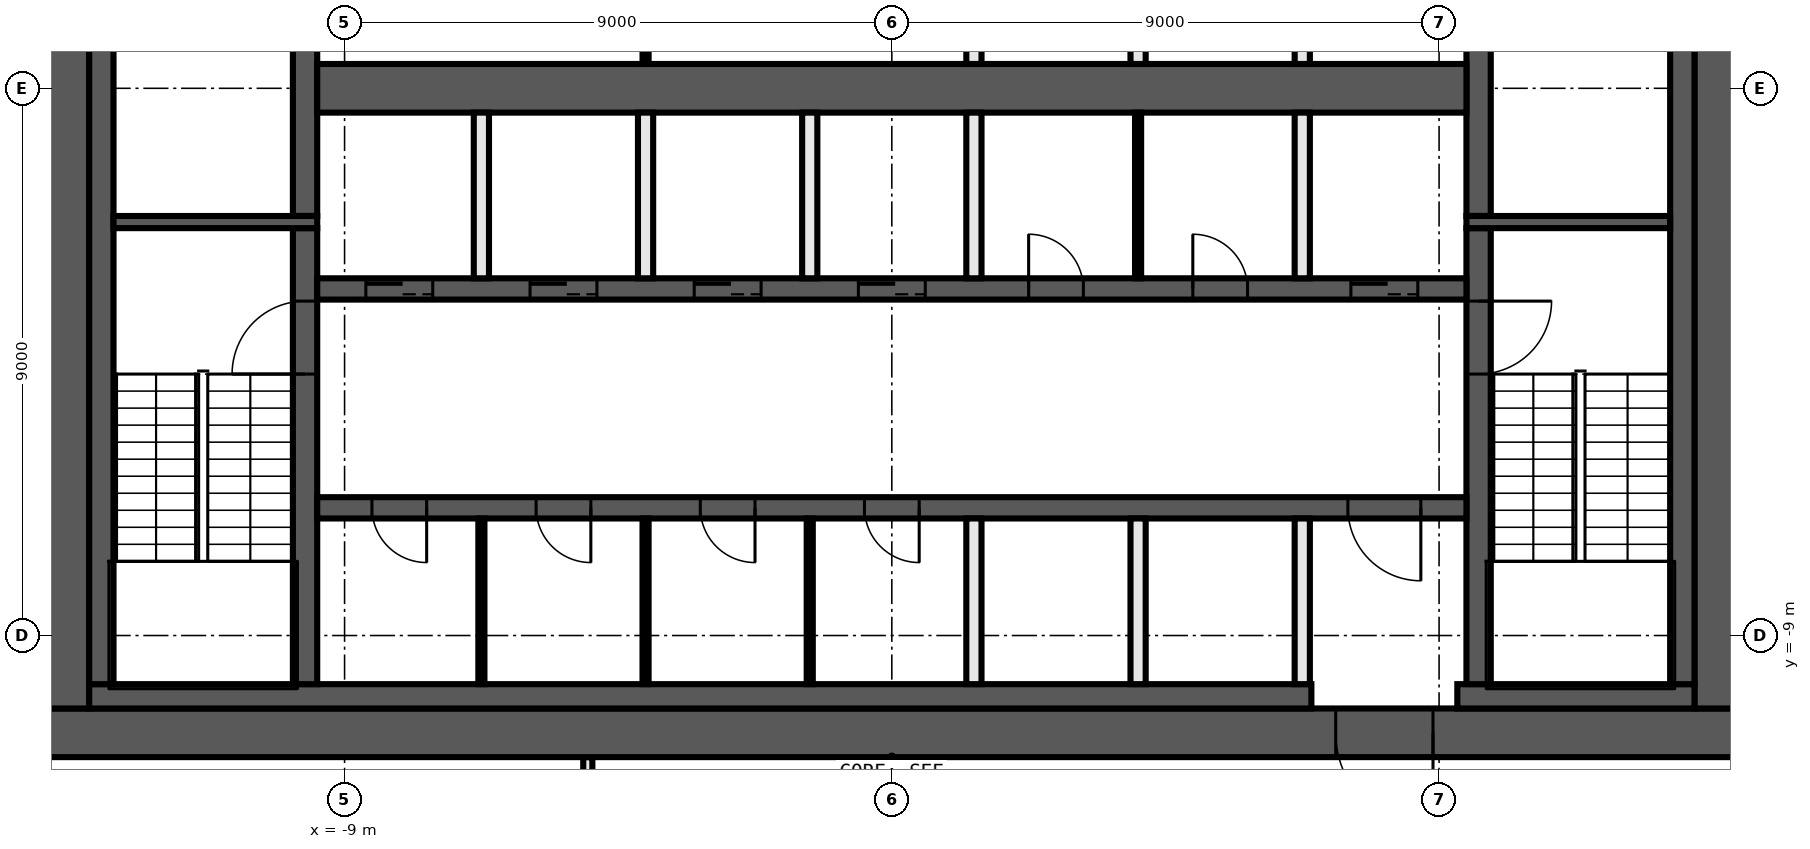
"""IFC4 building model, lengths in metres.
Left out: names, types, materials, properties, quantities, classifications, styles, units other than length and angle.
Written with IfcOpenShell. Run it as: python <this file> out.ifc"""

import sys

from ifc_helpers import new_model, si_unit, direction, frame, frame_2d, origin, place, context, subcontext, project, spatial, rectangle, extrude, element, fill, save


model = new_model("IFC4")
c1 = context("Model", 3, precision=1e-05, world=origin(), true_north=direction((0.0, 1.0)))
c2 = subcontext(c1, "Body", "Model", "MODEL_VIEW")
j1 = project(units=[si_unit("LENGTHUNIT", "METRE"), si_unit("PLANEANGLEUNIT", "RADIAN")], contexts=[c1])
p1 = place(None, origin())
s1 = spatial("IfcSite", under=j1, at=p1, CompositionType="ELEMENT")
p2 = place(p1, origin())
s2 = spatial("IfcBuilding", under=s1, at=p2, CompositionType="ELEMENT")
p3 = place(p2, frame((0.0, 0.0, 203.0)))
s3 = spatial("IfcBuildingStorey", under=s2, at=p3, CompositionType="ELEMENT", Elevation=203.0)
p4 = place(p3, frame((-5.0, -14.125, 0.0), z_axis=(0.0, 0.0, 1.0), x_axis=(0.0, 1.0, 0.0)))
e1 = element("IfcWall", 1, at=p4, inside=s3, PredefinedType="PARTITIONING", context=c2, shape_type="SweptSolid", body=[
    extrude(rectangle(XDim=3.125, YDim=0.15, at=frame_2d((1.562, 0.0))), origin(), (0.0, 0.0, 1.0), 3.82),
])
p5 = place(p3, frame((14.0, -10.6, 0.0), z_axis=(0.0, 0.0, 1.0), x_axis=(-1.0, 0.0, 0.0)))
e2 = element("IfcWall", 2, at=p5, inside=s3, PredefinedType="SHEAR", context=c2, shape_type="SweptSolid", body=[
    extrude(rectangle(XDim=28.0, YDim=0.8, at=frame_2d((14.0, 0.0))), origin(), (0.0, 0.0, 1.0), 3.82),
])
p6 = place(p5, frame((5.1, 0.0, 0.0)))
e3 = element("IfcOpeningElement", 3, at=p6, cuts=e2, PredefinedType="OPENING", context=c2, shape_type="SweptSolid", body=[
    extrude(rectangle(XDim=1.6, YDim=2.1, at=frame_2d((0.8, 1.05))), frame((0.0, 0.41, 0.0), z_axis=(0.0, -1.0, 0.0), x_axis=(1.0, 0.0, 0.0)), (0.0, 0.0, 1.0), 0.82),
])
for number, where, z_axis, x_axis in (
    (4, (13.6, 10.2, 0.0), (0.0, 0.0, 1.0), (0.0, -1.0, 0.0)),
    (5, (-13.6, -10.2, 0.0), (0.0, 0.0, 1.0), (0.0, 1.0, 0.0)),
):
    element("IfcWall", number, at=place(p3, frame(where, z_axis=z_axis, x_axis=x_axis)), inside=s3, PredefinedType="SHEAR", context=c2, shape_type="SweptSolid", body=[
        extrude(rectangle(XDim=20.4, YDim=0.8, at=frame_2d((10.2, 0.0))), origin(), (0.0, 0.0, 1.0), 3.82),
    ])
p7 = place(p3, frame((13.2, -10.0, 0.0), z_axis=(0.0, 0.0, 1.0), x_axis=(-1.0, 0.0, 0.0)))
e6 = element("IfcWall", 6, at=p7, inside=s3, PredefinedType="SHEAR", context=c2, shape_type="SweptSolid", body=[
    extrude(rectangle(XDim=3.9, YDim=0.4, at=frame_2d((1.95, 0.0))), origin(), (0.0, 0.0, 1.0), 3.82),
])
p8 = place(p3, frame((6.9, -10.0, 0.0), z_axis=(0.0, 0.0, 1.0), x_axis=(-1.0, 0.0, 0.0)))
e7 = element("IfcWall", 7, at=p8, inside=s3, PredefinedType="SHEAR", context=c2, shape_type="SweptSolid", body=[
    extrude(rectangle(XDim=20.1, YDim=0.4, at=frame_2d((10.05, 0.0))), origin(), (0.0, 0.0, 1.0), 3.82),
])
for number, where, z_axis, x_axis in (
    (8, (13.0, 9.8, 0.0), (0.0, 0.0, 1.0), (0.0, -1.0, 0.0)),
    (9, (-13.0, -9.8, 0.0), (0.0, 0.0, 1.0), (0.0, 1.0, 0.0)),
):
    element("IfcWall", number, at=place(p3, frame(where, z_axis=z_axis, x_axis=x_axis)), inside=s3, PredefinedType="SHEAR", context=c2, shape_type="SweptSolid", body=[
        extrude(rectangle(XDim=19.6, YDim=0.4, at=frame_2d((9.8, 0.0))), origin(), (0.0, 0.0, 1.0), 3.82),
    ])
p9 = place(p3, frame((9.65, -2.3, 0.0), z_axis=(0.0, 0.0, 1.0), x_axis=(0.0, -1.0, 0.0)))
e10 = element("IfcWall", 10, at=p9, inside=s3, PredefinedType="SHEAR", context=c2, shape_type="SweptSolid", body=[
    extrude(rectangle(XDim=7.5, YDim=0.4, at=frame_2d((3.75, 0.0))), origin(), (0.0, 0.0, 1.0), 3.82),
])
p10 = place(p9, frame((1.2, 0.0, 0.0)))
e11 = element("IfcOpeningElement", 11, at=p10, cuts=e10, PredefinedType="OPENING", context=c2, shape_type="SweptSolid", body=[
    extrude(rectangle(XDim=1.2, YDim=2.1, at=frame_2d((0.6, 1.05))), frame((0.0, 0.21, 0.0), z_axis=(0.0, -1.0, 0.0), x_axis=(1.0, 0.0, 0.0)), (0.0, 0.0, 1.0), 0.42),
])
p11 = place(p3, frame((9.65, 2.1, 0.0), z_axis=(0.0, 0.0, 1.0), x_axis=(0.0, -1.0, 0.0)))
e12 = element("IfcWall", 12, at=p11, inside=s3, PredefinedType="SHEAR", context=c2, shape_type="SweptSolid", body=[
    extrude(rectangle(XDim=4.2, YDim=0.4, at=frame_2d((2.1, 0.0))), origin(), (0.0, 0.0, 1.0), 3.82),
])
p12 = place(p11, frame((0.15, 0.0, 0.0)))
e13 = element("IfcOpeningElement", 13, at=p12, cuts=e12, PredefinedType="OPENING", context=c2, shape_type="SweptSolid", body=[
    extrude(rectangle(XDim=0.9, YDim=2.1, at=frame_2d((0.45, 1.05))), frame((0.0, 0.21, 0.0), z_axis=(0.0, -1.0, 0.0), x_axis=(1.0, 0.0, 0.0)), (0.0, 0.0, 1.0), 0.42),
])
p13 = place(p3, frame((-9.65, -9.8, 0.0), z_axis=(0.0, 0.0, 1.0), x_axis=(0.0, 1.0, 0.0)))
e14 = element("IfcWall", 14, at=p13, inside=s3, PredefinedType="SHEAR", context=c2, shape_type="SweptSolid", body=[
    extrude(rectangle(XDim=7.5, YDim=0.4, at=frame_2d((3.75, 0.0))), origin(), (0.0, 0.0, 1.0), 3.82),
])
p14 = place(p13, frame((5.1, 0.0, 0.0)))
e15 = element("IfcOpeningElement", 15, at=p14, cuts=e14, PredefinedType="OPENING", context=c2, shape_type="SweptSolid", body=[
    extrude(rectangle(XDim=1.2, YDim=2.1, at=frame_2d((0.6, 1.05))), frame((0.0, 0.21, 0.0), z_axis=(0.0, -1.0, 0.0), x_axis=(1.0, 0.0, 0.0)), (0.0, 0.0, 1.0), 0.42),
])
p15 = place(p3, frame((-9.65, -2.1, 0.0), z_axis=(0.0, 0.0, 1.0), x_axis=(0.0, 1.0, 0.0)))
e16 = element("IfcWall", 16, at=p15, inside=s3, PredefinedType="SHEAR", context=c2, shape_type="SweptSolid", body=[
    extrude(rectangle(XDim=4.2, YDim=0.4, at=frame_2d((2.1, 0.0))), origin(), (0.0, 0.0, 1.0), 3.82),
])
for number, where, z_axis, x_axis in (
    (17, (9.45, -2.2, 0.0), (0.0, 0.0, 1.0), (1.0, 0.0, 0.0)),
    (18, (-9.45, -2.2, 0.0), (0.0, 0.0, 1.0), (-1.0, 0.0, 0.0)),
):
    element("IfcWall", number, at=place(p3, frame(where, z_axis=z_axis, x_axis=x_axis)), inside=s3, PredefinedType="SHEAR", context=c2, shape_type="SweptSolid", body=[
        extrude(rectangle(XDim=3.35, YDim=0.2, at=frame_2d((1.675, 0.0))), origin(), (0.0, 0.0, 1.0), 3.82),
    ])
p16 = place(p3, frame((-9.45, -3.3, 0.0), z_axis=(0.0, 0.0, 1.0), x_axis=(1.0, 0.0, 0.0)))
e19 = element("IfcWall", 19, at=p16, inside=s3, PredefinedType="SHEAR", context=c2, shape_type="SweptSolid", body=[
    extrude(rectangle(XDim=18.9, YDim=0.35, at=frame_2d((9.45, 0.0))), origin(), (0.0, 0.0, 1.0), 3.82),
])
p17 = place(p16, frame((0.8, 0.0, 0.0)))
e20 = element("IfcOpeningElement", 20, at=p17, cuts=e19, PredefinedType="OPENING", context=c2, shape_type="SweptSolid", body=[
    extrude(rectangle(XDim=1.1, YDim=2.1, at=frame_2d((0.55, 1.05))), frame((0.0, 0.185, 0.0), z_axis=(0.0, -1.0, 0.0), x_axis=(1.0, 0.0, 0.0)), (0.0, 0.0, 1.0), 0.37),
])
p18 = place(p16, frame((3.5, 0.0, 0.0)))
e21 = element("IfcOpeningElement", 21, at=p18, cuts=e19, PredefinedType="OPENING", context=c2, shape_type="SweptSolid", body=[
    extrude(rectangle(XDim=1.1, YDim=2.1, at=frame_2d((0.55, 1.05))), frame((0.0, 0.185, 0.0), z_axis=(0.0, -1.0, 0.0), x_axis=(1.0, 0.0, 0.0)), (0.0, 0.0, 1.0), 0.37),
])
p19 = place(p16, frame((6.2, 0.0, 0.0)))
e22 = element("IfcOpeningElement", 22, at=p19, cuts=e19, PredefinedType="OPENING", context=c2, shape_type="SweptSolid", body=[
    extrude(rectangle(XDim=1.1, YDim=2.1, at=frame_2d((0.55, 1.05))), frame((0.0, 0.185, 0.0), z_axis=(0.0, -1.0, 0.0), x_axis=(1.0, 0.0, 0.0)), (0.0, 0.0, 1.0), 0.37),
])
p20 = place(p16, frame((8.9, 0.0, 0.0)))
e23 = element("IfcOpeningElement", 23, at=p20, cuts=e19, PredefinedType="OPENING", context=c2, shape_type="SweptSolid", body=[
    extrude(rectangle(XDim=1.1, YDim=2.1, at=frame_2d((0.55, 1.05))), frame((0.0, 0.185, 0.0), z_axis=(0.0, -1.0, 0.0), x_axis=(1.0, 0.0, 0.0)), (0.0, 0.0, 1.0), 0.37),
])
p21 = place(p16, frame((17.0, 0.0, 0.0)))
e24 = element("IfcOpeningElement", 24, at=p21, cuts=e19, PredefinedType="OPENING", context=c2, shape_type="SweptSolid", body=[
    extrude(rectangle(XDim=1.1, YDim=2.1, at=frame_2d((0.55, 1.05))), frame((0.0, 0.185, 0.0), z_axis=(0.0, -1.0, 0.0), x_axis=(1.0, 0.0, 0.0)), (0.0, 0.0, 1.0), 0.37),
])
p22 = place(p16, frame((11.7, 0.0, 0.0)))
e25 = element("IfcOpeningElement", 25, at=p22, cuts=e19, PredefinedType="OPENING", context=c2, shape_type="SweptSolid", body=[
    extrude(rectangle(XDim=0.9, YDim=2.1, at=frame_2d((0.45, 1.05))), frame((0.0, 0.185, 0.0), z_axis=(0.0, -1.0, 0.0), x_axis=(1.0, 0.0, 0.0)), (0.0, 0.0, 1.0), 0.37),
])
p23 = place(p16, frame((14.4, 0.0, 0.0)))
e26 = element("IfcOpeningElement", 26, at=p23, cuts=e19, PredefinedType="OPENING", context=c2, shape_type="SweptSolid", body=[
    extrude(rectangle(XDim=0.9, YDim=2.1, at=frame_2d((0.45, 1.05))), frame((0.0, 0.185, 0.0), z_axis=(0.0, -1.0, 0.0), x_axis=(1.0, 0.0, 0.0)), (0.0, 0.0, 1.0), 0.37),
])
p24 = place(p3, frame((9.45, -6.9, 0.0), z_axis=(0.0, 0.0, 1.0), x_axis=(-1.0, 0.0, 0.0)))
e27 = element("IfcWall", 27, at=p24, inside=s3, PredefinedType="SHEAR", context=c2, shape_type="SweptSolid", body=[
    extrude(rectangle(XDim=18.9, YDim=0.35, at=frame_2d((9.45, 0.0))), origin(), (0.0, 0.0, 1.0), 3.82),
])
p25 = place(p24, frame((0.75, 0.0, 0.0)))
e28 = element("IfcOpeningElement", 28, at=p25, cuts=e27, PredefinedType="OPENING", context=c2, shape_type="SweptSolid", body=[
    extrude(rectangle(XDim=1.2, YDim=2.1, at=frame_2d((0.6, 1.05))), frame((0.0, 0.185, 0.0), z_axis=(0.0, -1.0, 0.0), x_axis=(1.0, 0.0, 0.0)), (0.0, 0.0, 1.0), 0.37),
])
p26 = place(p24, frame((17.1, 0.0, 0.0)))
e29 = element("IfcOpeningElement", 29, at=p26, cuts=e27, PredefinedType="OPENING", context=c2, shape_type="SweptSolid", body=[
    extrude(rectangle(XDim=0.9, YDim=2.1, at=frame_2d((0.45, 1.05))), frame((0.0, 0.185, 0.0), z_axis=(0.0, -1.0, 0.0), x_axis=(1.0, 0.0, 0.0)), (0.0, 0.0, 1.0), 0.37),
])
p27 = place(p24, frame((14.4, 0.0, 0.0)))
e30 = element("IfcOpeningElement", 30, at=p27, cuts=e27, PredefinedType="OPENING", context=c2, shape_type="SweptSolid", body=[
    extrude(rectangle(XDim=0.9, YDim=2.1, at=frame_2d((0.45, 1.05))), frame((0.0, 0.185, 0.0), z_axis=(0.0, -1.0, 0.0), x_axis=(1.0, 0.0, 0.0)), (0.0, 0.0, 1.0), 0.37),
])
p28 = place(p24, frame((11.7, 0.0, 0.0)))
e31 = element("IfcOpeningElement", 31, at=p28, cuts=e27, PredefinedType="OPENING", context=c2, shape_type="SweptSolid", body=[
    extrude(rectangle(XDim=0.9, YDim=2.1, at=frame_2d((0.45, 1.05))), frame((0.0, 0.185, 0.0), z_axis=(0.0, -1.0, 0.0), x_axis=(1.0, 0.0, 0.0)), (0.0, 0.0, 1.0), 0.37),
])
p29 = place(p24, frame((9.0, 0.0, 0.0)))
e32 = element("IfcOpeningElement", 32, at=p29, cuts=e27, PredefinedType="OPENING", context=c2, shape_type="SweptSolid", body=[
    extrude(rectangle(XDim=0.9, YDim=2.1, at=frame_2d((0.45, 1.05))), frame((0.0, 0.185, 0.0), z_axis=(0.0, -1.0, 0.0), x_axis=(1.0, 0.0, 0.0)), (0.0, 0.0, 1.0), 0.37),
])
p30 = place(p3, frame((-9.45, 0.0, 0.0), z_axis=(0.0, 0.0, 1.0), x_axis=(1.0, 0.0, 0.0)))
e33 = element("IfcWall", 33, at=p30, inside=s3, PredefinedType="SHEAR", context=c2, shape_type="SweptSolid", body=[
    extrude(rectangle(XDim=18.9, YDim=0.8, at=frame_2d((9.45, 0.0))), origin(), (0.0, 0.0, 1.0), 3.82),
])
for number, where, z_axis, x_axis in (
    (34, (6.75, -9.8, 0.0), (0.0, 0.0, 1.0), (0.0, 1.0, 0.0)),
    (35, (6.75, -3.125, 0.0), (0.0, 0.0, 1.0), (0.0, 1.0, 0.0)),
    (36, (6.75, 0.4, 0.0), (0.0, 0.0, 1.0), (0.0, 1.0, 0.0)),
):
    element("IfcWall", number, at=place(p3, frame(where, z_axis=z_axis, x_axis=x_axis)), inside=s3, PredefinedType="SOLIDWALL", context=c2, shape_type="SweptSolid", body=[
        extrude(rectangle(XDim=2.725, YDim=0.25, at=frame_2d((1.363, 0.0))), origin(), (0.0, 0.0, 1.0), 3.82),
    ])
p31 = place(p3, frame((4.05, -3.125, 0.0), z_axis=(0.0, 0.0, 1.0), x_axis=(0.0, 1.0, 0.0)))
e37 = element("IfcWall", 37, at=p31, inside=s3, PredefinedType="PARTITIONING", context=c2, shape_type="SweptSolid", body=[
    extrude(rectangle(XDim=2.725, YDim=0.1, at=frame_2d((1.363, 0.0))), origin(), (0.0, 0.0, 1.0), 3.82),
])
for number, where, z_axis, x_axis in (
    (38, (4.05, -9.8, 0.0), (0.0, 0.0, 1.0), (0.0, 1.0, 0.0)),
    (39, (4.05, 0.4, 0.0), (0.0, 0.0, 1.0), (0.0, 1.0, 0.0)),
    (40, (1.35, -9.8, 0.0), (0.0, 0.0, 1.0), (0.0, 1.0, 0.0)),
    (41, (1.35, -3.125, 0.0), (0.0, 0.0, 1.0), (0.0, 1.0, 0.0)),
    (42, (1.35, 0.4, 0.0), (0.0, 0.0, 1.0), (0.0, 1.0, 0.0)),
):
    element("IfcWall", number, at=place(p3, frame(where, z_axis=z_axis, x_axis=x_axis)), inside=s3, PredefinedType="SOLIDWALL", context=c2, shape_type="SweptSolid", body=[
        extrude(rectangle(XDim=2.725, YDim=0.25, at=frame_2d((1.363, 0.0))), origin(), (0.0, 0.0, 1.0), 3.82),
    ])
p32 = place(p3, frame((-1.35, -9.8, 0.0), z_axis=(0.0, 0.0, 1.0), x_axis=(0.0, 1.0, 0.0)))
e43 = element("IfcWall", 43, at=p32, inside=s3, PredefinedType="PARTITIONING", context=c2, shape_type="SweptSolid", body=[
    extrude(rectangle(XDim=2.725, YDim=0.1, at=frame_2d((1.363, 0.0))), origin(), (0.0, 0.0, 1.0), 3.82),
])
p33 = place(p3, frame((-1.35, -3.125, 0.0), z_axis=(0.0, 0.0, 1.0), x_axis=(0.0, 1.0, 0.0)))
e44 = element("IfcWall", 44, at=p33, inside=s3, PredefinedType="SOLIDWALL", context=c2, shape_type="SweptSolid", body=[
    extrude(rectangle(XDim=2.725, YDim=0.25, at=frame_2d((1.363, 0.0))), origin(), (0.0, 0.0, 1.0), 3.82),
])
for number, where, z_axis, x_axis in (
    (45, (-4.05, -9.8, 0.0), (0.0, 0.0, 1.0), (0.0, 1.0, 0.0)),
    (46, (-4.05, 0.4, 0.0), (0.0, 0.0, 1.0), (0.0, 1.0, 0.0)),
):
    element("IfcWall", number, at=place(p3, frame(where, z_axis=z_axis, x_axis=x_axis)), inside=s3, PredefinedType="PARTITIONING", context=c2, shape_type="SweptSolid", body=[
        extrude(rectangle(XDim=2.725, YDim=0.1, at=frame_2d((1.363, 0.0))), origin(), (0.0, 0.0, 1.0), 3.82),
    ])
p34 = place(p3, frame((-4.05, -3.125, 0.0), z_axis=(0.0, 0.0, 1.0), x_axis=(0.0, 1.0, 0.0)))
e47 = element("IfcWall", 47, at=p34, inside=s3, PredefinedType="SOLIDWALL", context=c2, shape_type="SweptSolid", body=[
    extrude(rectangle(XDim=2.725, YDim=0.25, at=frame_2d((1.363, 0.0))), origin(), (0.0, 0.0, 1.0), 3.82),
])
p35 = place(p3, frame((-6.75, -9.8, 0.0), z_axis=(0.0, 0.0, 1.0), x_axis=(0.0, 1.0, 0.0)))
e48 = element("IfcWall", 48, at=p35, inside=s3, PredefinedType="PARTITIONING", context=c2, shape_type="SweptSolid", body=[
    extrude(rectangle(XDim=2.725, YDim=0.1, at=frame_2d((1.363, 0.0))), origin(), (0.0, 0.0, 1.0), 3.82),
])
p36 = place(p3, frame((-6.75, -3.125, 0.0), z_axis=(0.0, 0.0, 1.0), x_axis=(0.0, 1.0, 0.0)))
e49 = element("IfcWall", 49, at=p36, inside=s3, PredefinedType="SOLIDWALL", context=c2, shape_type="SweptSolid", body=[
    extrude(rectangle(XDim=2.725, YDim=0.25, at=frame_2d((1.363, 0.0))), origin(), (0.0, 0.0, 1.0), 3.82),
])
p37 = place(p17, origin())
e50 = element("IfcDoor", 50, at=p37, inside=s3, OperationType="DOUBLE_DOOR_SLIDING", PredefinedType="DOOR", context=c2, shape_type="SweptSolid", body=[
    extrude(rectangle(XDim=1.1, YDim=2.1, at=frame_2d((0.55, 1.05))), frame((0.0, 0.025, 0.0), z_axis=(0.0, -1.0, 0.0), x_axis=(1.0, 0.0, 0.0)), (0.0, 0.0, 1.0), 0.05),
])
fill(e20, e50)
p38 = place(p18, origin())
e51 = element("IfcDoor", 51, at=p38, inside=s3, OperationType="DOUBLE_DOOR_SLIDING", PredefinedType="DOOR", context=c2, shape_type="SweptSolid", body=[
    extrude(rectangle(XDim=1.1, YDim=2.1, at=frame_2d((0.55, 1.05))), frame((0.0, 0.025, 0.0), z_axis=(0.0, -1.0, 0.0), x_axis=(1.0, 0.0, 0.0)), (0.0, 0.0, 1.0), 0.05),
])
fill(e21, e51)
p39 = place(p19, origin())
e52 = element("IfcDoor", 52, at=p39, inside=s3, OperationType="DOUBLE_DOOR_SLIDING", PredefinedType="DOOR", context=c2, shape_type="SweptSolid", body=[
    extrude(rectangle(XDim=1.1, YDim=2.1, at=frame_2d((0.55, 1.05))), frame((0.0, 0.025, 0.0), z_axis=(0.0, -1.0, 0.0), x_axis=(1.0, 0.0, 0.0)), (0.0, 0.0, 1.0), 0.05),
])
fill(e22, e52)
p40 = place(p20, origin())
e53 = element("IfcDoor", 53, at=p40, inside=s3, OperationType="DOUBLE_DOOR_SLIDING", PredefinedType="DOOR", context=c2, shape_type="SweptSolid", body=[
    extrude(rectangle(XDim=1.1, YDim=2.1, at=frame_2d((0.55, 1.05))), frame((0.0, 0.025, 0.0), z_axis=(0.0, -1.0, 0.0), x_axis=(1.0, 0.0, 0.0)), (0.0, 0.0, 1.0), 0.05),
])
fill(e23, e53)
p41 = place(p21, origin())
e54 = element("IfcDoor", 54, at=p41, inside=s3, OperationType="DOUBLE_DOOR_SLIDING", PredefinedType="DOOR", context=c2, shape_type="SweptSolid", body=[
    extrude(rectangle(XDim=1.1, YDim=2.1, at=frame_2d((0.55, 1.05))), frame((0.0, 0.025, 0.0), z_axis=(0.0, -1.0, 0.0), x_axis=(1.0, 0.0, 0.0)), (0.0, 0.0, 1.0), 0.05),
])
fill(e24, e54)
p42 = place(p6, origin())
e55 = element("IfcDoor", 55, at=p42, inside=s3, OperationType="DOUBLE_DOOR_SINGLE_SWING", PredefinedType="DOOR", context=c2, shape_type="SweptSolid", body=[
    extrude(rectangle(XDim=1.6, YDim=2.1, at=frame_2d((0.8, 1.05))), frame((0.0, 0.025, 0.0), z_axis=(0.0, -1.0, 0.0), x_axis=(1.0, 0.0, 0.0)), (0.0, 0.0, 1.0), 0.05),
])
fill(e3, e55)
p43 = place(p25, origin())
e56 = element("IfcDoor", 56, at=p43, inside=s3, OperationType="SINGLE_SWING_LEFT", PredefinedType="DOOR", context=c2, shape_type="SweptSolid", body=[
    extrude(rectangle(XDim=1.2, YDim=2.1, at=frame_2d((0.6, 1.05))), frame((0.0, 0.025, 0.0), z_axis=(0.0, -1.0, 0.0), x_axis=(1.0, 0.0, 0.0)), (0.0, 0.0, 1.0), 0.05),
])
fill(e28, e56)
p44 = place(p22, origin())
e57 = element("IfcDoor", 57, at=p44, inside=s3, OperationType="SINGLE_SWING_LEFT", PredefinedType="DOOR", context=c2, shape_type="SweptSolid", body=[
    extrude(rectangle(XDim=0.9, YDim=2.1, at=frame_2d((0.45, 1.05))), frame((0.0, 0.025, 0.0), z_axis=(0.0, -1.0, 0.0), x_axis=(1.0, 0.0, 0.0)), (0.0, 0.0, 1.0), 0.05),
])
fill(e25, e57)
p45 = place(p23, origin())
e58 = element("IfcDoor", 58, at=p45, inside=s3, OperationType="SINGLE_SWING_RIGHT", PredefinedType="DOOR", context=c2, shape_type="SweptSolid", body=[
    extrude(rectangle(XDim=0.9, YDim=2.1, at=frame_2d((0.45, 1.05))), frame((0.0, 0.025, 0.0), z_axis=(0.0, -1.0, 0.0), x_axis=(1.0, 0.0, 0.0)), (0.0, 0.0, 1.0), 0.05),
])
fill(e26, e58)
p46 = place(p26, origin())
e59 = element("IfcDoor", 59, at=p46, inside=s3, OperationType="SINGLE_SWING_LEFT", PredefinedType="DOOR", context=c2, shape_type="SweptSolid", body=[
    extrude(rectangle(XDim=0.9, YDim=2.1, at=frame_2d((0.45, 1.05))), frame((0.0, 0.025, 0.0), z_axis=(0.0, -1.0, 0.0), x_axis=(1.0, 0.0, 0.0)), (0.0, 0.0, 1.0), 0.05),
])
fill(e29, e59)
p47 = place(p27, origin())
e60 = element("IfcDoor", 60, at=p47, inside=s3, OperationType="SINGLE_SWING_RIGHT", PredefinedType="DOOR", context=c2, shape_type="SweptSolid", body=[
    extrude(rectangle(XDim=0.9, YDim=2.1, at=frame_2d((0.45, 1.05))), frame((0.0, 0.025, 0.0), z_axis=(0.0, -1.0, 0.0), x_axis=(1.0, 0.0, 0.0)), (0.0, 0.0, 1.0), 0.05),
])
fill(e30, e60)
p48 = place(p28, origin())
e61 = element("IfcDoor", 61, at=p48, inside=s3, OperationType="SINGLE_SWING_LEFT", PredefinedType="DOOR", context=c2, shape_type="SweptSolid", body=[
    extrude(rectangle(XDim=0.9, YDim=2.1, at=frame_2d((0.45, 1.05))), frame((0.0, 0.025, 0.0), z_axis=(0.0, -1.0, 0.0), x_axis=(1.0, 0.0, 0.0)), (0.0, 0.0, 1.0), 0.05),
])
fill(e31, e61)
p49 = place(p29, origin())
e62 = element("IfcDoor", 62, at=p49, inside=s3, OperationType="SINGLE_SWING_RIGHT", PredefinedType="DOOR", context=c2, shape_type="SweptSolid", body=[
    extrude(rectangle(XDim=0.9, YDim=2.1, at=frame_2d((0.45, 1.05))), frame((0.0, 0.025, 0.0), z_axis=(0.0, -1.0, 0.0), x_axis=(1.0, 0.0, 0.0)), (0.0, 0.0, 1.0), 0.05),
])
fill(e32, e62)
p50 = place(p10, origin())
e63 = element("IfcDoor", 63, at=p50, inside=s3, OperationType="SINGLE_SWING_RIGHT", PredefinedType="DOOR", context=c2, shape_type="SweptSolid", body=[
    extrude(rectangle(XDim=1.2, YDim=2.1, at=frame_2d((0.6, 1.05))), frame((0.0, 0.025, 0.0), z_axis=(0.0, -1.0, 0.0), x_axis=(1.0, 0.0, 0.0)), (0.0, 0.0, 1.0), 0.05),
])
fill(e11, e63)
p51 = place(p14, origin())
e64 = element("IfcDoor", 64, at=p51, inside=s3, OperationType="SINGLE_SWING_LEFT", PredefinedType="DOOR", context=c2, shape_type="SweptSolid", body=[
    extrude(rectangle(XDim=1.2, YDim=2.1, at=frame_2d((0.6, 1.05))), frame((0.0, 0.025, 0.0), z_axis=(0.0, -1.0, 0.0), x_axis=(1.0, 0.0, 0.0)), (0.0, 0.0, 1.0), 0.05),
])
fill(e15, e64)
save(model, sys.argv[1])
